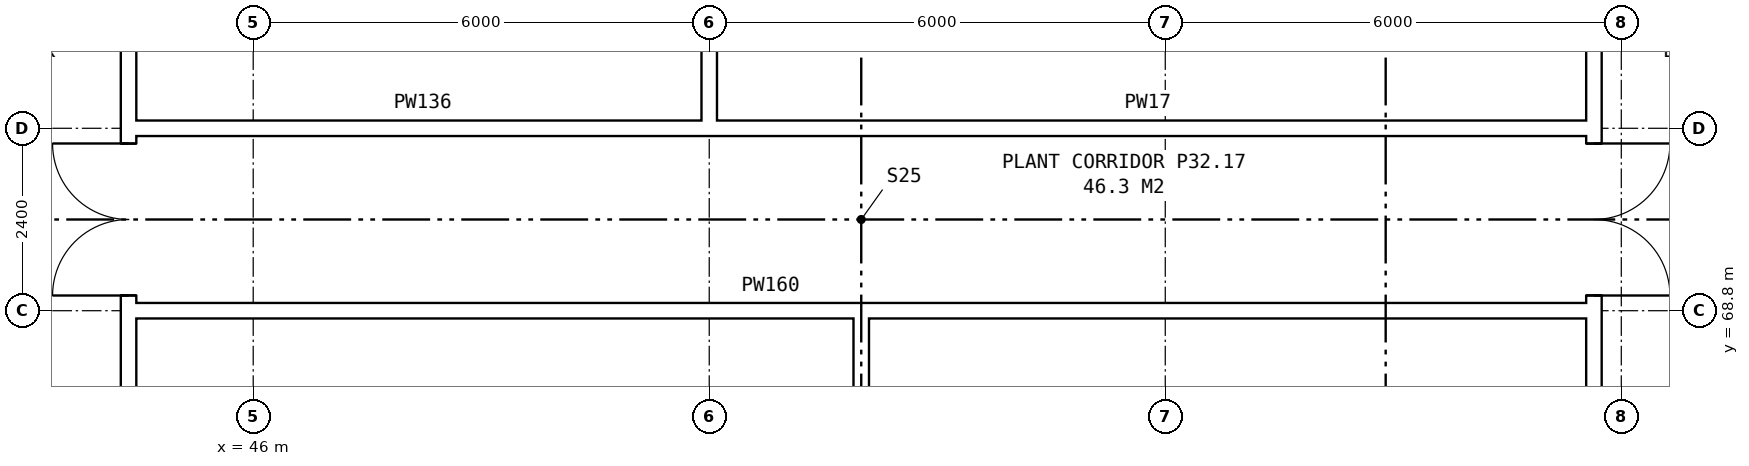
"""IFC4 building model, lengths in metres.
Left out: names, types, materials, properties, quantities, classifications, styles, units other than length and angle.
Written with IfcOpenShell. Run it as: python <this file> out.ifc"""

import sys

from ifc_helpers import new_model, si_unit, direction, frame, frame_2d, origin, place, context, subcontext, project, spatial, rectangle, extrude, element, fill, save


model = new_model("IFC4")
c1 = context("Model", 3, precision=1e-05, world=origin(), true_north=direction((0.0, 1.0)))
c2 = subcontext(c1, "Body", "Model", "MODEL_VIEW")
j1 = project(units=[si_unit("LENGTHUNIT", "METRE"), si_unit("PLANEANGLEUNIT", "RADIAN")], contexts=[c1])
p1 = place(None, origin())
s1 = spatial("IfcSite", under=j1, at=p1, CompositionType="ELEMENT")
p2 = place(p1, origin())
s2 = spatial("IfcBuilding", under=s1, at=p2, CompositionType="ELEMENT")
p3 = place(p2, frame((0.0, 0.0, 115.0)))
s3 = spatial("IfcBuildingStorey", under=s2, at=p3, CompositionType="ELEMENT", Elevation=115.0)
p4 = place(p3, frame((63.64, 63.9, 0.0), z_axis=(0.0, 0.0, 1.0), x_axis=(0.0, 1.0, 0.0)))
e1 = element("IfcWall", 1, at=p4, inside=s3, PredefinedType="PARTITIONING", context=c2, shape_type="SweptSolid", body=[
    extrude(rectangle(XDim=12.2, YDim=0.2, at=frame_2d((6.1, 0.0))), origin(), (0.0, 0.0, 1.0), 4.2),
])
p5 = place(p4, frame((5.1, 0.0, 0.0)))
e2 = element("IfcOpeningElement", 2, at=p5, cuts=e1, PredefinedType="OPENING", context=c2, shape_type="SweptSolid", body=[
    extrude(rectangle(XDim=2.0, YDim=2.1, at=frame_2d((1.0, 1.05))), frame((0.0, 0.11, 0.0), z_axis=(0.0, -1.0, 0.0), x_axis=(1.0, 0.0, 0.0)), (0.0, 0.0, 1.0), 0.22),
])
p6 = place(p3, frame((44.36, 63.9, 0.0), z_axis=(0.0, 0.0, 1.0), x_axis=(0.0, 1.0, 0.0)))
e3 = element("IfcWall", 3, at=p6, inside=s3, PredefinedType="PARTITIONING", context=c2, shape_type="SweptSolid", body=[
    extrude(rectangle(XDim=12.2, YDim=0.2, at=frame_2d((6.1, 0.0))), origin(), (0.0, 0.0, 1.0), 4.2),
])
p7 = place(p6, frame((5.1, 0.0, 0.0)))
e4 = element("IfcOpeningElement", 4, at=p7, cuts=e3, PredefinedType="OPENING", context=c2, shape_type="SweptSolid", body=[
    extrude(rectangle(XDim=2.0, YDim=2.1, at=frame_2d((1.0, 1.05))), frame((0.0, 0.11, 0.0), z_axis=(0.0, -1.0, 0.0), x_axis=(1.0, 0.0, 0.0)), (0.0, 0.0, 1.0), 0.22),
])
p8 = place(p3, frame((44.36, 68.8, 0.0), z_axis=(0.0, 0.0, 1.0), x_axis=(1.0, 0.0, 0.0)))
e5 = element("IfcWall", 5, at=p8, inside=s3, PredefinedType="PARTITIONING", context=c2, shape_type="SweptSolid", body=[
    extrude(rectangle(XDim=19.28, YDim=0.2, at=frame_2d((9.64, 0.0))), origin(), (0.0, 0.0, 1.0), 4.2),
])
p9 = place(p3, frame((51.9, 71.2, 0.0), z_axis=(0.0, 0.0, 1.0), x_axis=(1.0, 0.0, 0.0)))
e6 = element("IfcWall", 6, at=p9, inside=s3, PredefinedType="PARTITIONING", context=c2, shape_type="SweptSolid", body=[
    extrude(rectangle(XDim=11.74, YDim=0.2, at=frame_2d((5.87, 0.0))), origin(), (0.0, 0.0, 1.0), 4.2),
])
p10 = place(p3, frame((44.36, 71.2, 0.0), z_axis=(0.0, 0.0, 1.0), x_axis=(1.0, 0.0, 0.0)))
e7 = element("IfcWall", 7, at=p10, inside=s3, PredefinedType="PARTITIONING", context=c2, shape_type="SweptSolid", body=[
    extrude(rectangle(XDim=7.74, YDim=0.2, at=frame_2d((3.87, 0.0))), origin(), (0.0, 0.0, 1.0), 4.2),
])
for number, where, z_axis, x_axis in (
    (8, (52.0, 71.1, 0.0), (0.0, 0.0, 1.0), (0.0, 1.0, 0.0)),
    (9, (54.0, 63.7, 0.0), (0.0, 0.0, 1.0), (0.0, 1.0, 0.0)),
):
    element("IfcWall", number, at=place(p3, frame(where, z_axis=z_axis, x_axis=x_axis)), inside=s3, PredefinedType="PARTITIONING", context=c2, shape_type="SweptSolid", body=[
        extrude(rectangle(XDim=5.2, YDim=0.2, at=frame_2d((2.6, 0.0))), origin(), (0.0, 0.0, 1.0), 4.2),
    ])
p11 = place(p5, frame((2.0, 0.0, 0.0), z_axis=(0.0, 0.0, 1.0), x_axis=(-1.0, 0.0, 0.0)))
e10 = element("IfcDoor", 10, at=p11, inside=s3, OperationType="DOUBLE_DOOR_SINGLE_SWING", PredefinedType="DOOR", context=c2, shape_type="SweptSolid", body=[
    extrude(rectangle(XDim=2.0, YDim=2.1, at=frame_2d((1.0, 1.05))), frame((0.0, 0.025, 0.0), z_axis=(0.0, -1.0, 0.0), x_axis=(1.0, 0.0, 0.0)), (0.0, 0.0, 1.0), 0.05),
])
fill(e2, e10)
p12 = place(p7, origin())
e11 = element("IfcDoor", 11, at=p12, inside=s3, OperationType="DOUBLE_DOOR_SINGLE_SWING", PredefinedType="DOOR", context=c2, shape_type="SweptSolid", body=[
    extrude(rectangle(XDim=2.0, YDim=2.1, at=frame_2d((1.0, 1.05))), frame((0.0, 0.025, 0.0), z_axis=(0.0, -1.0, 0.0), x_axis=(1.0, 0.0, 0.0)), (0.0, 0.0, 1.0), 0.05),
])
fill(e4, e11)
save(model, sys.argv[1])
